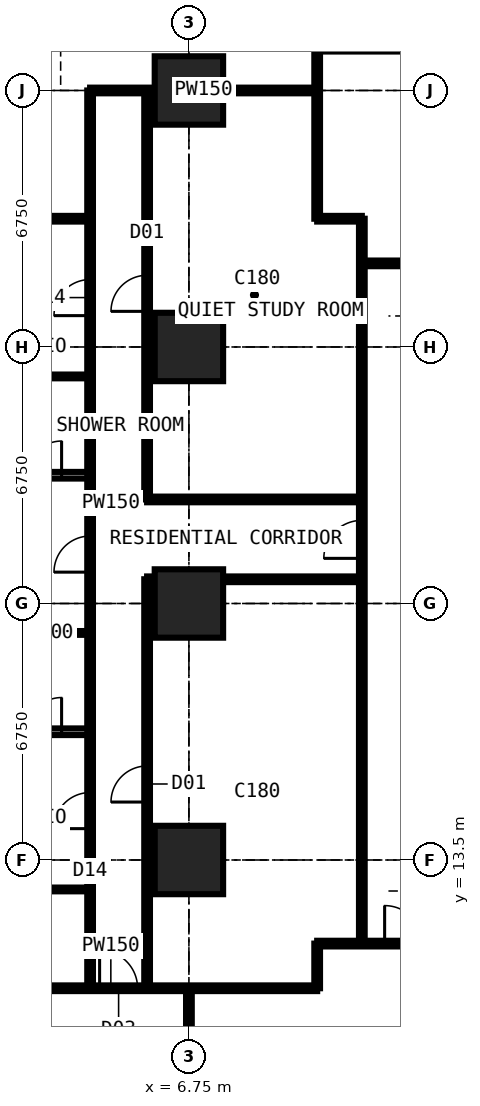
"""IFC4 building model, lengths in metres.
Left out: names, types, materials, properties, quantities, classifications, styles, units other than length and angle.
Written with IfcOpenShell. Run it as: python <this file> out.ifc"""

import sys

from ifc_helpers import new_model, si_unit, direction, frame, frame_2d, origin, origin_2d, place, context, subcontext, project, spatial, rectangle, extrude, element, fill, save


model = new_model("IFC4")
c1 = context("Model", 3, precision=1e-05, world=origin(), true_north=direction((0.0, 1.0)))
c2 = subcontext(c1, "Body", "Model", "MODEL_VIEW")
j1 = project(units=[si_unit("LENGTHUNIT", "METRE"), si_unit("PLANEANGLEUNIT", "RADIAN")], contexts=[c1])
p1 = place(None, origin())
s1 = spatial("IfcSite", under=j1, at=p1, CompositionType="ELEMENT")
p2 = place(p1, origin())
s2 = spatial("IfcBuilding", under=s1, at=p2, CompositionType="ELEMENT")
p3 = place(p2, frame((0.0, 0.0, 54.0)))
s3 = spatial("IfcBuildingStorey", under=s2, at=p3, CompositionType="ELEMENT", Elevation=54.0)
for number, where, z_axis, x_axis in (
    (1, (6.75, 13.5, 0.0), (0.0, 0.0, 1.0), (1.0, 0.0, 0.0)),
    (2, (6.75, 20.25, 0.0), (0.0, 0.0, 1.0), (1.0, 0.0, 0.0)),
    (3, (6.75, 27.0, 0.0), (0.0, 0.0, 1.0), (1.0, 0.0, 0.0)),
    (4, (6.75, 33.75, 0.0), (0.0, 0.0, 1.0), (1.0, 0.0, 0.0)),
):
    element("IfcColumn", number, at=place(p3, frame(where, z_axis=z_axis, x_axis=x_axis)), inside=s3, PredefinedType="COLUMN", context=c2, shape_type="SweptSolid", body=[
        extrude(rectangle(XDim=1.8, YDim=1.8, at=origin_2d()), origin(), (0.0, 0.0, 1.0), 3.6),
    ])
p4 = place(p3, frame((-0.734, 10.125, 0.0), z_axis=(0.0, 0.0, 1.0), x_axis=(1.0, 0.0, 0.0)))
e5 = element("IfcWall", 5, at=p4, inside=s3, PredefinedType="PARTITIONING", context=c2, shape_type="SweptSolid", body=[
    extrude(rectangle(XDim=10.859, YDim=0.15, at=frame_2d((5.429, 0.0))), origin(), (0.0, 0.0, 1.0), 3.375),
])
p5 = place(p4, frame((5.134, 0.0, 0.0)))
e6 = element("IfcOpeningElement", 6, at=p5, cuts=e5, PredefinedType="OPENING", context=c2, shape_type="SweptSolid", body=[
    extrude(rectangle(XDim=1.0, YDim=2.2, at=frame_2d((0.5, 1.1))), frame((0.0, 0.085, 0.0), z_axis=(0.0, -1.0, 0.0), x_axis=(1.0, 0.0, 0.0)), (0.0, 0.0, 1.0), 0.17),
])
p6 = place(p3, frame((-0.734, 16.875, 0.0), z_axis=(0.0, 0.0, 1.0), x_axis=(1.0, 0.0, 0.0)))
e7 = element("IfcWall", 7, at=p6, inside=s3, PredefinedType="PARTITIONING", context=c2, shape_type="SweptSolid", body=[
    extrude(rectangle(XDim=4.884, YDim=0.175, at=frame_2d((2.442, 0.0))), origin(), (0.0, 0.0, 1.0), 3.375),
])
p7 = place(p6, frame((3.234, 0.0, 0.0)))
e8 = element("IfcOpeningElement", 8, at=p7, cuts=e7, PredefinedType="OPENING", context=c2, shape_type="SweptSolid", body=[
    extrude(rectangle(XDim=0.9, YDim=2.2, at=frame_2d((0.45, 1.1))), frame((0.0, 0.097, 0.0), z_axis=(0.0, -1.0, 0.0), x_axis=(1.0, 0.0, 0.0)), (0.0, 0.0, 1.0), 0.195),
])
p8 = place(p3, frame((-0.734, 23.625, 0.0), z_axis=(0.0, 0.0, 1.0), x_axis=(1.0, 0.0, 0.0)))
e9 = element("IfcWall", 9, at=p8, inside=s3, PredefinedType="PARTITIONING", context=c2, shape_type="SweptSolid", body=[
    extrude(rectangle(XDim=4.884, YDim=0.175, at=frame_2d((2.442, 0.0))), origin(), (0.0, 0.0, 1.0), 3.375),
])
p9 = place(p8, frame((3.234, 0.0, 0.0)))
e10 = element("IfcOpeningElement", 10, at=p9, cuts=e9, PredefinedType="OPENING", context=c2, shape_type="SweptSolid", body=[
    extrude(rectangle(XDim=0.9, YDim=2.2, at=frame_2d((0.45, 1.1))), frame((0.0, 0.097, 0.0), z_axis=(0.0, -1.0, 0.0), x_axis=(1.0, 0.0, 0.0)), (0.0, 0.0, 1.0), 0.195),
])
p10 = place(p3, frame((-0.734, 30.375, 0.0), z_axis=(0.0, 0.0, 1.0), x_axis=(1.0, 0.0, 0.0)))
e11 = element("IfcWall", 11, at=p10, inside=s3, PredefinedType="PARTITIONING", context=c2, shape_type="SweptSolid", body=[
    extrude(rectangle(XDim=4.884, YDim=0.15, at=frame_2d((2.442, 0.0))), origin(), (0.0, 0.0, 1.0), 3.375),
])
for number, where, z_axis, x_axis in (
    (12, (1.75, 12.725, 0.0), (0.0, 0.0, 1.0), (1.0, 0.0, 0.0)),
    (13, (1.75, 19.475, 0.0), (0.0, 0.0, 1.0), (1.0, 0.0, 0.0)),
    (14, (1.75, 26.225, 0.0), (0.0, 0.0, 1.0), (1.0, 0.0, 0.0)),
):
    element("IfcWall", number, at=place(p3, frame(where, z_axis=z_axis, x_axis=x_axis)), inside=s3, PredefinedType="PARTITIONING", context=c2, shape_type="SweptSolid", body=[
        extrude(rectangle(XDim=2.4, YDim=0.1, at=frame_2d((1.2, 0.0))), origin(), (0.0, 0.0, 1.0), 3.375),
    ])
p11 = place(p3, frame((4.15, 10.125, 0.0), z_axis=(0.0, 0.0, 1.0), x_axis=(0.0, 1.0, 0.0)))
e15 = element("IfcWall", 15, at=p11, inside=s3, PredefinedType="PARTITIONING", context=c2, shape_type="SweptSolid", body=[
    extrude(rectangle(XDim=23.625, YDim=0.15, at=frame_2d((11.812, 0.0))), origin(), (0.0, 0.0, 1.0), 3.375),
])
p12 = place(p11, frame((4.2, 0.0, 0.0)))
e16 = element("IfcOpeningElement", 16, at=p12, cuts=e15, PredefinedType="OPENING", context=c2, shape_type="SweptSolid", body=[
    extrude(rectangle(XDim=0.95, YDim=2.2, at=frame_2d((0.475, 1.1))), frame((0.0, 0.085, 0.0), z_axis=(0.0, -1.0, 0.0), x_axis=(1.0, 0.0, 0.0)), (0.0, 0.0, 1.0), 0.17),
])
p13 = place(p11, frame((10.95, 0.0, 0.0)))
e17 = element("IfcOpeningElement", 17, at=p13, cuts=e15, PredefinedType="OPENING", context=c2, shape_type="SweptSolid", body=[
    extrude(rectangle(XDim=0.95, YDim=2.2, at=frame_2d((0.475, 1.1))), frame((0.0, 0.085, 0.0), z_axis=(0.0, -1.0, 0.0), x_axis=(1.0, 0.0, 0.0)), (0.0, 0.0, 1.0), 0.17),
])
p14 = place(p11, frame((17.7, 0.0, 0.0)))
e18 = element("IfcOpeningElement", 18, at=p14, cuts=e15, PredefinedType="OPENING", context=c2, shape_type="SweptSolid", body=[
    extrude(rectangle(XDim=0.95, YDim=2.2, at=frame_2d((0.475, 1.1))), frame((0.0, 0.085, 0.0), z_axis=(0.0, -1.0, 0.0), x_axis=(1.0, 0.0, 0.0)), (0.0, 0.0, 1.0), 0.17),
])
p15 = place(p3, frame((4.15, 33.75, 0.0), z_axis=(0.0, 0.0, 1.0), x_axis=(1.0, 0.0, 0.0)))
e19 = element("IfcWall", 19, at=p15, inside=s3, PredefinedType="PARTITIONING", context=c2, shape_type="SweptSolid", body=[
    extrude(rectangle(XDim=5.975, YDim=0.15, at=frame_2d((2.988, 0.0))), origin(), (0.0, 0.0, 1.0), 2.877),
])
p16 = place(p3, frame((5.65, 10.125, 0.0), z_axis=(0.0, 0.0, 1.0), x_axis=(0.0, 1.0, 0.0)))
e20 = element("IfcWall", 20, at=p16, inside=s3, PredefinedType="PARTITIONING", context=c2, shape_type="SweptSolid", body=[
    extrude(rectangle(XDim=10.762, YDim=0.15, at=frame_2d((5.381, 0.0))), origin(), (0.0, 0.0, 1.0), 3.375),
])
p17 = place(p16, frame((4.9, 0.0, 0.0)))
e21 = element("IfcOpeningElement", 21, at=p17, cuts=e20, PredefinedType="OPENING", context=c2, shape_type="SweptSolid", body=[
    extrude(rectangle(XDim=0.95, YDim=2.2, at=frame_2d((0.475, 1.1))), frame((0.0, 0.085, 0.0), z_axis=(0.0, -1.0, 0.0), x_axis=(1.0, 0.0, 0.0)), (0.0, 0.0, 1.0), 0.17),
])
p18 = place(p3, frame((5.65, 20.887, 0.0), z_axis=(0.0, 0.0, 1.0), x_axis=(1.0, 0.0, 0.0)))
e22 = element("IfcWall", 22, at=p18, inside=s3, PredefinedType="PARTITIONING", context=c2, shape_type="SweptSolid", body=[
    extrude(rectangle(XDim=5.65, YDim=0.15, at=frame_2d((2.825, 0.0))), origin(), (0.0, 0.0, 1.0), 3.375),
])
p19 = place(p3, frame((5.65, 22.988, 0.0), z_axis=(0.0, 0.0, 1.0), x_axis=(0.0, 1.0, 0.0)))
e23 = element("IfcWall", 23, at=p19, inside=s3, PredefinedType="PARTITIONING", context=c2, shape_type="SweptSolid", body=[
    extrude(rectangle(XDim=10.762, YDim=0.15, at=frame_2d((5.381, 0.0))), origin(), (0.0, 0.0, 1.0), 3.375),
])
p20 = place(p19, frame((4.95, 0.0, 0.0)))
e24 = element("IfcOpeningElement", 24, at=p20, cuts=e23, PredefinedType="OPENING", context=c2, shape_type="SweptSolid", body=[
    extrude(rectangle(XDim=0.95, YDim=2.2, at=frame_2d((0.475, 1.1))), frame((0.0, 0.085, 0.0), z_axis=(0.0, -1.0, 0.0), x_axis=(1.0, 0.0, 0.0)), (0.0, 0.0, 1.0), 0.17),
])
p21 = place(p3, frame((5.65, 22.988, 0.0), z_axis=(0.0, 0.0, 1.0), x_axis=(1.0, 0.0, 0.0)))
e25 = element("IfcWall", 25, at=p21, inside=s3, PredefinedType="PARTITIONING", context=c2, shape_type="SweptSolid", body=[
    extrude(rectangle(XDim=5.65, YDim=0.15, at=frame_2d((2.825, 0.0))), origin(), (0.0, 0.0, 1.0), 3.375),
])
p22 = place(p3, frame((6.75, -0.734, 0.0), z_axis=(0.0, 0.0, 1.0), x_axis=(0.0, 1.0, 0.0)))
e26 = element("IfcWall", 26, at=p22, inside=s3, PredefinedType="PARTITIONING", context=c2, shape_type="SweptSolid", body=[
    extrude(rectangle(XDim=10.859, YDim=0.15, at=frame_2d((5.429, 0.0))), origin(), (0.0, 0.0, 1.0), 2.877),
])
p23 = place(p3, frame((10.125, 10.125, 0.0), z_axis=(0.0, 0.0, 1.0), x_axis=(0.0, 1.0, 0.0)))
e27 = element("IfcWall", 27, at=p23, inside=s3, PredefinedType="PARTITIONING", context=c2, shape_type="SweptSolid", body=[
    extrude(rectangle(XDim=1.175, YDim=0.15, at=frame_2d((0.587, 0.0))), origin(), (0.0, 0.0, 1.0), 3.375),
])
p24 = place(p3, frame((10.125, 11.3, 0.0), z_axis=(0.0, 0.0, 1.0), x_axis=(1.0, 0.0, 0.0)))
e28 = element("IfcWall", 28, at=p24, inside=s3, PredefinedType="PARTITIONING", context=c2, shape_type="SweptSolid", body=[
    extrude(rectangle(XDim=20.675, YDim=0.15, at=frame_2d((10.337, 0.0))), origin(), (0.0, 0.0, 1.0), 3.375),
])
p25 = place(p24, frame((1.775, 0.0, 0.0)))
e29 = element("IfcOpeningElement", 29, at=p25, cuts=e28, PredefinedType="OPENING", context=c2, shape_type="SweptSolid", body=[
    extrude(rectangle(XDim=1.0, YDim=2.2, at=frame_2d((0.5, 1.1))), frame((0.0, 0.085, 0.0), z_axis=(0.0, -1.0, 0.0), x_axis=(1.0, 0.0, 0.0)), (0.0, 0.0, 1.0), 0.17),
])
p26 = place(p24, frame((11.312, 0.0, 0.0)))
e30 = element("IfcOpeningElement", 30, at=p26, cuts=e28, PredefinedType="OPENING", context=c2, shape_type="SweptSolid", body=[
    extrude(rectangle(XDim=1.0, YDim=2.2, at=frame_2d((0.5, 1.1))), frame((0.0, 0.085, 0.0), z_axis=(0.0, -1.0, 0.0), x_axis=(1.0, 0.0, 0.0)), (0.0, 0.0, 1.0), 0.17),
])
p27 = place(p3, frame((10.125, 30.375, 0.0), z_axis=(0.0, 0.0, 1.0), x_axis=(0.0, 1.0, 0.0)))
e31 = element("IfcWall", 31, at=p27, inside=s3, PredefinedType="PARTITIONING", context=c2, shape_type="SweptSolid", body=[
    extrude(rectangle(XDim=10.859, YDim=0.15, at=frame_2d((5.429, 0.0))), origin(), (0.0, 0.0, 1.0), 3.375),
])
p28 = place(p27, frame((4.725, 0.0, 0.0)))
e32 = element("IfcOpeningElement", 32, at=p28, cuts=e31, PredefinedType="OPENING", context=c2, shape_type="SweptSolid", body=[
    extrude(rectangle(XDim=1.0, YDim=2.2, at=frame_2d((0.5, 1.1))), frame((0.0, 0.085, 0.0), z_axis=(0.0, -1.0, 0.0), x_axis=(1.0, 0.0, 0.0)), (0.0, 0.0, 1.0), 0.17),
])
p29 = place(p3, frame((10.125, 30.375, 0.0), z_axis=(0.0, 0.0, 1.0), x_axis=(1.0, 0.0, 0.0)))
e33 = element("IfcWall", 33, at=p29, inside=s3, PredefinedType="PARTITIONING", context=c2, shape_type="SweptSolid", body=[
    extrude(rectangle(XDim=1.175, YDim=0.15, at=frame_2d((0.587, 0.0))), origin(), (0.0, 0.0, 1.0), 3.375),
])
p30 = place(p3, frame((11.3, 11.3, 0.0), z_axis=(0.0, 0.0, 1.0), x_axis=(0.0, 1.0, 0.0)))
e34 = element("IfcWall", 34, at=p30, inside=s3, PredefinedType="PARTITIONING", context=c2, shape_type="SweptSolid", body=[
    extrude(rectangle(XDim=19.075, YDim=0.15, at=frame_2d((9.538, 0.0))), origin(), (0.0, 0.0, 1.0), 3.375),
])
p31 = place(p30, frame((10.137, 0.0, 0.0)))
e35 = element("IfcOpeningElement", 35, at=p31, cuts=e34, PredefinedType="OPENING", context=c2, shape_type="SweptSolid", body=[
    extrude(rectangle(XDim=1.0, YDim=2.2, at=frame_2d((0.5, 1.1))), frame((0.0, 0.085, 0.0), z_axis=(0.0, -1.0, 0.0), x_axis=(1.0, 0.0, 0.0)), (0.0, 0.0, 1.0), 0.17),
])
p32 = place(p3, frame((11.3, 29.2, 0.0), z_axis=(0.0, 0.0, 1.0), x_axis=(1.0, 0.0, 0.0)))
e36 = element("IfcWall", 36, at=p32, inside=s3, PredefinedType="PARTITIONING", context=c2, shape_type="SweptSolid", body=[
    extrude(rectangle(XDim=19.075, YDim=0.15, at=frame_2d((9.538, 0.0))), origin(), (0.0, 0.0, 1.0), 3.375),
])
p33 = place(p32, frame((12.875, 0.0, 0.0)))
e37 = element("IfcOpeningElement", 37, at=p33, cuts=e36, PredefinedType="OPENING", context=c2, shape_type="SweptSolid", body=[
    extrude(rectangle(XDim=1.0, YDim=2.2, at=frame_2d((0.5, 1.1))), frame((0.0, 0.085, 0.0), z_axis=(0.0, -1.0, 0.0), x_axis=(1.0, 0.0, 0.0)), (0.0, 0.0, 1.0), 0.17),
])
p34 = place(p32, frame((10.438, 0.0, 0.0)))
e38 = element("IfcOpeningElement", 38, at=p34, cuts=e36, PredefinedType="OPENING", context=c2, shape_type="SweptSolid", body=[
    extrude(rectangle(XDim=1.0, YDim=2.2, at=frame_2d((0.5, 1.1))), frame((0.0, 0.085, 0.0), z_axis=(0.0, -1.0, 0.0), x_axis=(1.0, 0.0, 0.0)), (0.0, 0.0, 1.0), 0.17),
])
p35 = place(p32, frame((14.875, 0.0, 0.0)))
e39 = element("IfcOpeningElement", 39, at=p35, cuts=e36, PredefinedType="OPENING", context=c2, shape_type="SweptSolid", body=[
    extrude(rectangle(XDim=0.95, YDim=2.2, at=frame_2d((0.475, 1.1))), frame((0.0, 0.085, 0.0), z_axis=(0.0, -1.0, 0.0), x_axis=(1.0, 0.0, 0.0)), (0.0, 0.0, 1.0), 0.17),
])
p36 = place(p5, origin())
e40 = element("IfcDoor", 40, at=p36, inside=s3, OperationType="SINGLE_SWING_LEFT", PredefinedType="DOOR", context=c2, shape_type="SweptSolid", body=[
    extrude(rectangle(XDim=1.0, YDim=2.2, at=frame_2d((0.5, 1.1))), frame((0.0, 0.025, 0.0), z_axis=(0.0, -1.0, 0.0), x_axis=(1.0, 0.0, 0.0)), (0.0, 0.0, 1.0), 0.05),
])
fill(e6, e40)
p37 = place(p25, origin())
e41 = element("IfcDoor", 41, at=p37, inside=s3, OperationType="SINGLE_SWING_LEFT", PredefinedType="DOOR", context=c2, shape_type="SweptSolid", body=[
    extrude(rectangle(XDim=1.0, YDim=2.2, at=frame_2d((0.5, 1.1))), frame((0.0, 0.025, 0.0), z_axis=(0.0, -1.0, 0.0), x_axis=(1.0, 0.0, 0.0)), (0.0, 0.0, 1.0), 0.05),
])
fill(e29, e41)
p38 = place(p12, origin())
e42 = element("IfcDoor", 42, at=p38, inside=s3, OperationType="SINGLE_SWING_LEFT", PredefinedType="DOOR", context=c2, shape_type="SweptSolid", body=[
    extrude(rectangle(XDim=0.95, YDim=2.2, at=frame_2d((0.475, 1.1))), frame((0.0, 0.025, 0.0), z_axis=(0.0, -1.0, 0.0), x_axis=(1.0, 0.0, 0.0)), (0.0, 0.0, 1.0), 0.05),
])
fill(e16, e42)
p39 = place(p13, origin())
e43 = element("IfcDoor", 43, at=p39, inside=s3, OperationType="SINGLE_SWING_LEFT", PredefinedType="DOOR", context=c2, shape_type="SweptSolid", body=[
    extrude(rectangle(XDim=0.95, YDim=2.2, at=frame_2d((0.475, 1.1))), frame((0.0, 0.025, 0.0), z_axis=(0.0, -1.0, 0.0), x_axis=(1.0, 0.0, 0.0)), (0.0, 0.0, 1.0), 0.05),
])
fill(e17, e43)
p40 = place(p7, origin())
e44 = element("IfcDoor", 44, at=p40, inside=s3, OperationType="SINGLE_SWING_RIGHT", PredefinedType="DOOR", context=c2, shape_type="SweptSolid", body=[
    extrude(rectangle(XDim=0.9, YDim=2.2, at=frame_2d((0.45, 1.1))), frame((0.0, 0.025, 0.0), z_axis=(0.0, -1.0, 0.0), x_axis=(1.0, 0.0, 0.0)), (0.0, 0.0, 1.0), 0.05),
])
fill(e8, e44)
p41 = place(p14, origin())
e45 = element("IfcDoor", 45, at=p41, inside=s3, OperationType="SINGLE_SWING_LEFT", PredefinedType="DOOR", context=c2, shape_type="SweptSolid", body=[
    extrude(rectangle(XDim=0.95, YDim=2.2, at=frame_2d((0.475, 1.1))), frame((0.0, 0.025, 0.0), z_axis=(0.0, -1.0, 0.0), x_axis=(1.0, 0.0, 0.0)), (0.0, 0.0, 1.0), 0.05),
])
fill(e18, e45)
p42 = place(p9, origin())
e46 = element("IfcDoor", 46, at=p42, inside=s3, OperationType="SINGLE_SWING_RIGHT", PredefinedType="DOOR", context=c2, shape_type="SweptSolid", body=[
    extrude(rectangle(XDim=0.9, YDim=2.2, at=frame_2d((0.45, 1.1))), frame((0.0, 0.025, 0.0), z_axis=(0.0, -1.0, 0.0), x_axis=(1.0, 0.0, 0.0)), (0.0, 0.0, 1.0), 0.05),
])
fill(e10, e46)
p43 = place(p31, origin())
e47 = element("IfcDoor", 47, at=p43, inside=s3, OperationType="SINGLE_SWING_LEFT", PredefinedType="DOOR", context=c2, shape_type="SweptSolid", body=[
    extrude(rectangle(XDim=1.0, YDim=2.2, at=frame_2d((0.5, 1.1))), frame((0.0, 0.025, 0.0), z_axis=(0.0, -1.0, 0.0), x_axis=(1.0, 0.0, 0.0)), (0.0, 0.0, 1.0), 0.05),
])
fill(e35, e47)
p44 = place(p17, origin())
e48 = element("IfcDoor", 48, at=p44, inside=s3, OperationType="SINGLE_SWING_LEFT", PredefinedType="DOOR", context=c2, shape_type="SweptSolid", body=[
    extrude(rectangle(XDim=0.95, YDim=2.2, at=frame_2d((0.475, 1.1))), frame((0.0, 0.025, 0.0), z_axis=(0.0, -1.0, 0.0), x_axis=(1.0, 0.0, 0.0)), (0.0, 0.0, 1.0), 0.05),
])
fill(e21, e48)
p45 = place(p20, origin())
e49 = element("IfcDoor", 49, at=p45, inside=s3, OperationType="SINGLE_SWING_LEFT", PredefinedType="DOOR", context=c2, shape_type="SweptSolid", body=[
    extrude(rectangle(XDim=0.95, YDim=2.2, at=frame_2d((0.475, 1.1))), frame((0.0, 0.025, 0.0), z_axis=(0.0, -1.0, 0.0), x_axis=(1.0, 0.0, 0.0)), (0.0, 0.0, 1.0), 0.05),
])
fill(e24, e49)
save(model, sys.argv[1])
